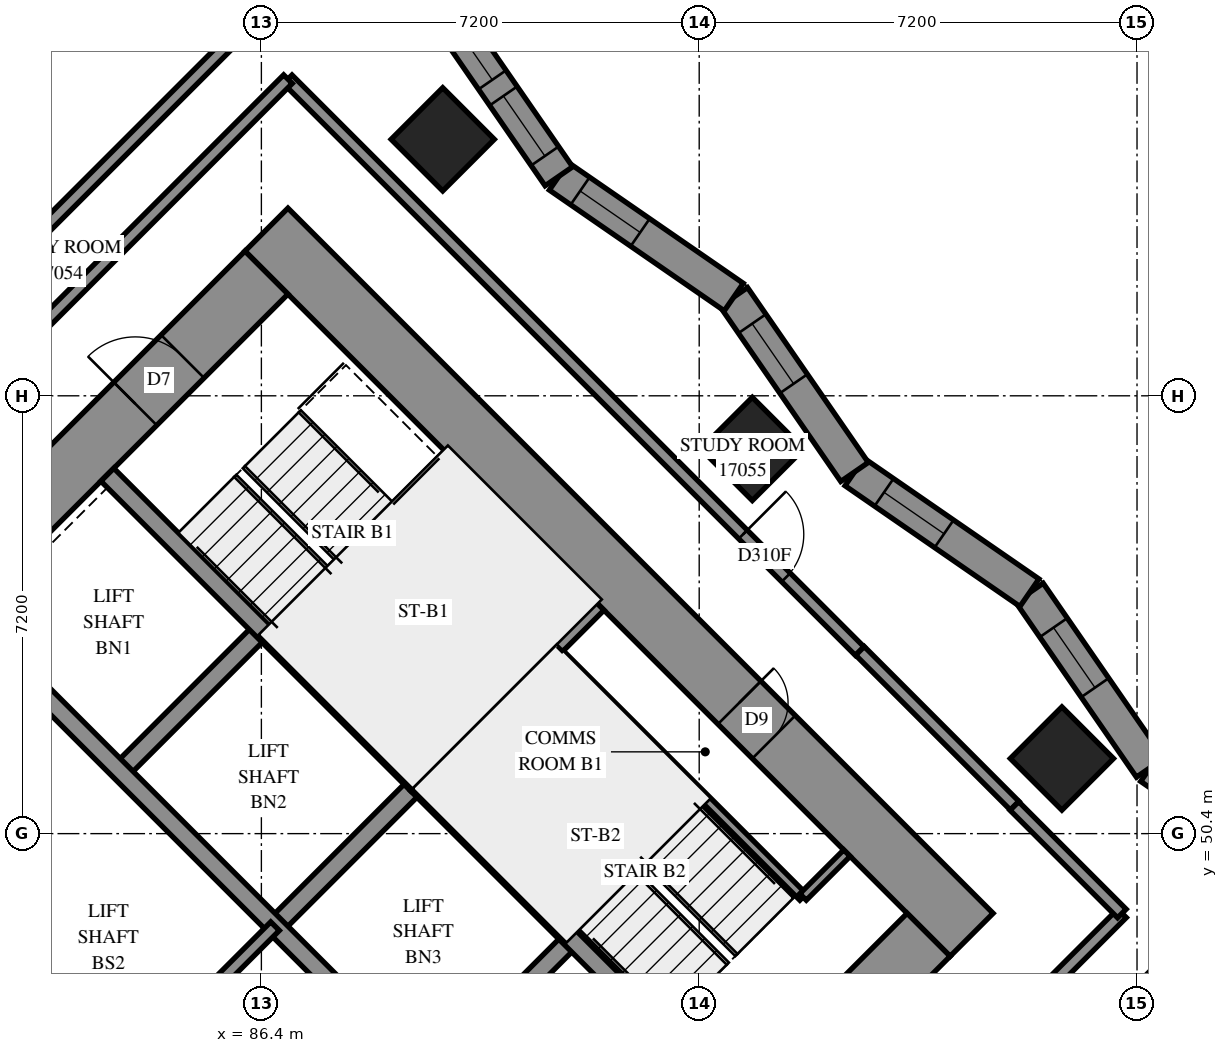
"""IFC4 building model, lengths in metres.
Left out: names, types, materials, properties, quantities, classifications, styles, units other than length and angle.
Written with IfcOpenShell. Run it as: python <this file> out.ifc"""

import sys

from ifc_helpers import new_model, si_unit, direction, frame, frame_2d, origin, origin_2d, place, context, subcontext, project, spatial, polyline, rectangle, outline, extrude, element, fill, save


model = new_model("IFC4")
c1 = context("Model", 3, precision=1e-05, world=origin(), true_north=direction((0.0, 1.0)))
c2 = subcontext(c1, "Body", "Model", "MODEL_VIEW")
j1 = project(units=[si_unit("LENGTHUNIT", "METRE"), si_unit("PLANEANGLEUNIT", "RADIAN")], contexts=[c1])
p1 = place(None, origin())
s1 = spatial("IfcSite", under=j1, at=p1, CompositionType="ELEMENT")
p2 = place(p1, origin())
s2 = spatial("IfcBuilding", under=s1, at=p2, CompositionType="ELEMENT")
p3 = place(p2, frame((0.0, 0.0, 64.4)))
s3 = spatial("IfcBuildingStorey", under=s2, at=p3, CompositionType="ELEMENT", Elevation=64.4)
for number, where, z_axis, x_axis in (
    (1, (89.382, 61.818, 0.0), (0.0, 0.0, 1.0), (0.707, -0.707, 0.0)),
    (2, (94.474, 56.727, 0.0), (0.0, 0.0, 1.0), (0.707, -0.707, 0.0)),
    (3, (99.565, 51.635, 0.0), (0.0, 0.0, 1.0), (0.707, -0.707, 0.0)),
):
    element("IfcColumn", number, at=place(p3, frame(where, z_axis=z_axis, x_axis=x_axis)), inside=s3, PredefinedType="COLUMN", context=c2, shape_type="SweptSolid", body=[
        extrude(rectangle(XDim=1.2, YDim=1.2, at=origin_2d()), origin(), (0.0, 0.0, 1.0), 3.1),
    ])
p4 = place(p3, frame((75.594, 49.443, -0.3), z_axis=(0.0, 0.0, 1.0), x_axis=(0.7071037324, -0.70710983, 0.0)))
e4 = element("IfcWall", 4, at=p4, inside=s3, PredefinedType="SHEAR", context=c2, shape_type="SweptSolid", body=[
    extrude(rectangle(XDim=16.4, YDim=1.0, at=frame_2d((8.2, 0.0))), origin(), (0.0, 0.0, 1.0), 2.7),
])
p5 = place(p3, frame((86.483, 60.333, -0.3), z_axis=(0.0, 0.0, 1.0), x_axis=(0.70710983, -0.7071037324, 0.0)))
e5 = element("IfcWall", 5, at=p5, inside=s3, PredefinedType="SHEAR", context=c2, shape_type="SweptSolid", body=[
    extrude(rectangle(XDim=16.4, YDim=1.0, at=frame_2d((8.2, 0.0))), origin(), (0.0, 0.0, 1.0), 2.7),
])
p6 = place(p5, frame((11.0, 0.0, 0.3)))
e6 = element("IfcOpeningElement", 6, at=p6, cuts=e5, PredefinedType="OPENING", context=c2, shape_type="SweptSolid", body=[
    extrude(rectangle(XDim=0.8, YDim=2.1, at=frame_2d((0.4, 1.05))), frame((0.0, 0.51, 0.0), z_axis=(0.0, -1.0, 0.0), x_axis=(1.0, 0.0, 0.0)), (0.0, 0.0, 1.0), 1.02),
])
p7 = place(p3, frame((76.301, 49.443, -0.3), z_axis=(0.0, 0.0, 1.0), x_axis=(0.7071067812, 0.7071067812, 0.0)))
e7 = element("IfcWall", 7, at=p7, inside=s3, PredefinedType="SHEAR", context=c2, shape_type="SweptSolid", body=[
    extrude(rectangle(XDim=14.4, YDim=1.0, at=frame_2d((7.2, 0.0))), origin(), (0.0, 0.0, 1.0), 2.7),
])
p8 = place(p7, frame((4.55, 0.0, 0.3)))
e8 = element("IfcOpeningElement", 8, at=p8, cuts=e7, PredefinedType="OPENING", context=c2, shape_type="SweptSolid", body=[
    extrude(rectangle(XDim=1.1, YDim=2.1, at=frame_2d((0.55, 1.05))), frame((0.0, 0.51, 0.0), z_axis=(0.0, -1.0, 0.0), x_axis=(1.0, 0.0, 0.0)), (0.0, 0.0, 1.0), 1.02),
])
p9 = place(p7, frame((11.35, 0.0, 0.3)))
e9 = element("IfcOpeningElement", 9, at=p9, cuts=e7, PredefinedType="OPENING", context=c2, shape_type="SweptSolid", body=[
    extrude(rectangle(XDim=1.1, YDim=2.1, at=frame_2d((0.55, 1.05))), frame((0.0, 0.51, 0.0), z_axis=(0.0, -1.0, 0.0), x_axis=(1.0, 0.0, 0.0)), (0.0, 0.0, 1.0), 1.02),
])
p10 = place(p3, frame((87.19, 38.554, -0.3), z_axis=(0.0, 0.0, 1.0), x_axis=(0.707103309, 0.7071102534, 0.0)))
e10 = element("IfcWall", 10, at=p10, inside=s3, PredefinedType="SHEAR", context=c2, shape_type="SweptSolid", body=[
    extrude(rectangle(XDim=14.4, YDim=1.0, at=frame_2d((7.2, 0.0))), origin(), (0.0, 0.0, 1.0), 2.7),
])
p11 = place(p10, frame((4.55, 0.0, 0.3)))
e11 = element("IfcOpeningElement", 11, at=p11, cuts=e10, PredefinedType="OPENING", context=c2, shape_type="SweptSolid", body=[
    extrude(rectangle(XDim=1.1, YDim=2.1, at=frame_2d((0.55, 1.05))), frame((0.0, 0.51, 0.0), z_axis=(0.0, -1.0, 0.0), x_axis=(1.0, 0.0, 0.0)), (0.0, 0.0, 1.0), 1.02),
])
p12 = place(p10, frame((11.35, 0.0, 0.3)))
e12 = element("IfcOpeningElement", 12, at=p12, cuts=e10, PredefinedType="OPENING", context=c2, shape_type="SweptSolid", body=[
    extrude(rectangle(XDim=1.1, YDim=2.1, at=frame_2d((0.55, 1.05))), frame((0.0, 0.51, 0.0), z_axis=(0.0, -1.0, 0.0), x_axis=(1.0, 0.0, 0.0)), (0.0, 0.0, 1.0), 1.02),
])
p13 = place(p3, frame((84.079, 51.423, 0.0), z_axis=(0.0, 0.0, 1.0), x_axis=(0.7071219326, 0.7070916295, 0.0)))
e13 = element("IfcWall", 13, at=p13, inside=s3, PredefinedType="SOLIDWALL", context=c2, shape_type="SweptSolid", body=[
    extrude(rectangle(XDim=3.3, YDim=0.3, at=frame_2d((1.65, 0.0))), origin(), (0.0, 0.0, 1.0), 3.1),
])
for number, where, z_axis, x_axis in (
    (14, (86.625, 48.878, 0.0), (0.0, 0.0, 1.0), (0.707, 0.707, 0.0)),
    (15, (89.17, 46.332, 0.0), (0.0, 0.0, 1.0), (0.707, 0.707, 0.0)),
):
    element("IfcWall", number, at=place(p3, frame(where, z_axis=z_axis, x_axis=x_axis)), inside=s3, PredefinedType="SOLIDWALL", context=c2, shape_type="SweptSolid", body=[
        extrude(rectangle(XDim=3.3, YDim=0.3, at=frame_2d((1.65, 0.0))), origin(), (0.0, 0.0, 1.0), 3.1),
    ])
p14 = place(p3, frame((78.988, 51.423, 0.0), z_axis=(0.0, 0.0, 1.0), x_axis=(0.7071067812, -0.7071067812, 0.0)))
e16 = element("IfcWall", 16, at=p14, inside=s3, PredefinedType="SOLIDWALL", context=c2, shape_type="SweptSolid", body=[
    extrude(rectangle(XDim=14.4, YDim=0.3, at=frame_2d((7.2, 0.0))), origin(), (0.0, 0.0, 1.0), 3.1),
])
p15 = place(p14, frame((1.25, 0.0, 0.0)))
e17 = element("IfcOpeningElement", 17, at=p15, cuts=e16, PredefinedType="OPENING", context=c2, shape_type="SweptSolid", body=[
    extrude(rectangle(XDim=1.1, YDim=2.1, at=frame_2d((0.55, 1.05))), frame((0.0, 0.16, 0.0), z_axis=(0.0, -1.0, 0.0), x_axis=(1.0, 0.0, 0.0)), (0.0, 0.0, 1.0), 0.32),
])
p16 = place(p14, frame((4.85, 0.0, 0.0)))
e18 = element("IfcOpeningElement", 18, at=p16, cuts=e16, PredefinedType="OPENING", context=c2, shape_type="SweptSolid", body=[
    extrude(rectangle(XDim=1.1, YDim=2.1, at=frame_2d((0.55, 1.05))), frame((0.0, 0.16, 0.0), z_axis=(0.0, -1.0, 0.0), x_axis=(1.0, 0.0, 0.0)), (0.0, 0.0, 1.0), 0.32),
])
p17 = place(p14, frame((8.45, 0.0, 0.0)))
e19 = element("IfcOpeningElement", 19, at=p17, cuts=e16, PredefinedType="OPENING", context=c2, shape_type="SweptSolid", body=[
    extrude(rectangle(XDim=1.1, YDim=2.1, at=frame_2d((0.55, 1.05))), frame((0.0, 0.16, 0.0), z_axis=(0.0, -1.0, 0.0), x_axis=(1.0, 0.0, 0.0)), (0.0, 0.0, 1.0), 0.32),
])
p18 = place(p14, frame((12.05, 0.0, 0.0)))
e20 = element("IfcOpeningElement", 20, at=p18, cuts=e16, PredefinedType="OPENING", context=c2, shape_type="SweptSolid", body=[
    extrude(rectangle(XDim=1.1, YDim=2.1, at=frame_2d((0.55, 1.05))), frame((0.0, 0.16, 0.0), z_axis=(0.0, -1.0, 0.0), x_axis=(1.0, 0.0, 0.0)), (0.0, 0.0, 1.0), 0.32),
])
p19 = place(p3, frame((81.534, 53.969, 0.0), z_axis=(0.0, 0.0, 1.0), x_axis=(0.707103309, -0.7071102534, 0.0)))
e21 = element("IfcWall", 21, at=p19, inside=s3, PredefinedType="SOLIDWALL", context=c2, shape_type="SweptSolid", body=[
    extrude(rectangle(XDim=14.4, YDim=0.3, at=frame_2d((7.2, 0.0))), origin(), (0.0, 0.0, 1.0), 3.1),
])
p20 = place(p19, frame((12.05, 0.0, 0.0)))
e22 = element("IfcOpeningElement", 22, at=p20, cuts=e21, PredefinedType="OPENING", context=c2, shape_type="SweptSolid", body=[
    extrude(rectangle(XDim=1.1, YDim=2.1, at=frame_2d((0.55, 1.05))), frame((0.0, 0.16, 0.0), z_axis=(0.0, -1.0, 0.0), x_axis=(1.0, 0.0, 0.0)), (0.0, 0.0, 1.0), 0.32),
])
for number, where, z_axis, x_axis in (
    (23, (83.867, 56.302, 0.0), (0.0, 0.0, 1.0), (0.707, -0.707, 0.0)),
    (24, (88.958, 51.211, 0.0), (0.0, 0.0, 1.0), (0.707, -0.707, 0.0)),
):
    element("IfcWall", number, at=place(p3, frame(where, z_axis=z_axis, x_axis=x_axis)), inside=s3, PredefinedType="SOLIDWALL", context=c2, shape_type="SweptSolid", body=[
        extrude(rectangle(XDim=7.2, YDim=0.3, at=frame_2d((3.6, 0.0))), origin(), (0.0, 0.0, 1.0), 3.1),
    ])
p21 = place(p3, frame((88.958, 51.211, 0.0), z_axis=(0.0, 0.0, 1.0), x_axis=(0.7071067812, 0.7071067812, 0.0)))
e25 = element("IfcWall", 25, at=p21, inside=s3, PredefinedType="SOLIDWALL", context=c2, shape_type="SweptSolid", body=[
    extrude(rectangle(XDim=4.2, YDim=0.3, at=frame_2d((2.1, 0.0))), origin(), (0.0, 0.0, 1.0), 3.1),
])
p22 = place(p3, frame((103.893, 49.499, 0.0), z_axis=(0.0, 0.0, 1.0), x_axis=(-0.8229761943, 0.5680758609, 0.0)))
e26 = element("IfcWall", 26, at=p22, inside=s3, PredefinedType="SOLIDWALL", context=c2, shape_type="SweptSolid", body=[
    extrude(outline(polyline([(-0.05, -0.275), (3.445, -0.275), (3.546, 0.275), (0.05, 0.275), (-0.05, -0.275)])), origin(), (0.0, 0.0, 1.0), 3.1),
])
p23 = place(p22, frame((1.541, 0.0, 0.5)))
e27 = element("IfcOpeningElement", 27, at=p23, cuts=e26, PredefinedType="OPENING", context=c2, shape_type="SweptSolid", body=[
    extrude(rectangle(XDim=1.2, YDim=2.45, at=frame_2d((0.6, 1.225))), frame((0.0, 0.285, 0.0), z_axis=(0.0, -1.0, 0.0), x_axis=(1.0, 0.0, 0.0)), (0.0, 0.0, 1.0), 0.57),
])
p24 = place(p3, frame((101.016, 51.485, 0.0), z_axis=(0.0, 0.0, 1.0), x_axis=(-0.5680892359, 0.8229669617, 0.0)))
e28 = element("IfcWall", 28, at=p24, inside=s3, PredefinedType="SOLIDWALL", context=c2, shape_type="SweptSolid", body=[
    extrude(outline(polyline([(0.05, -0.275), (3.546, -0.275), (3.445, 0.275), (-0.05, 0.275), (0.05, -0.275)])), origin(), (0.0, 0.0, 1.0), 3.1),
])
p25 = place(p24, frame((1.598, 0.0, 0.5)))
e29 = element("IfcOpeningElement", 29, at=p25, cuts=e28, PredefinedType="OPENING", context=c2, shape_type="SweptSolid", body=[
    extrude(rectangle(XDim=1.2, YDim=2.45, at=frame_2d((0.6, 1.225))), frame((0.0, 0.285, 0.0), z_axis=(0.0, -1.0, 0.0), x_axis=(1.0, 0.0, 0.0)), (0.0, 0.0, 1.0), 0.57),
])
p26 = place(p3, frame((99.031, 54.362, 0.0), z_axis=(0.0, 0.0, 1.0), x_axis=(-0.8229669617, 0.5680892359, 0.0)))
e30 = element("IfcWall", 30, at=p26, inside=s3, PredefinedType="SOLIDWALL", context=c2, shape_type="SweptSolid", body=[
    extrude(outline(polyline([(-0.05, -0.275), (3.445, -0.275), (3.546, 0.275), (0.05, 0.275), (-0.05, -0.275)])), origin(), (0.0, 0.0, 1.0), 3.1),
])
p27 = place(p26, frame((1.706, 0.0, 0.5)))
e31 = element("IfcOpeningElement", 31, at=p27, cuts=e30, PredefinedType="OPENING", context=c2, shape_type="SweptSolid", body=[
    extrude(rectangle(XDim=1.2, YDim=2.45, at=frame_2d((0.6, 1.225))), frame((0.0, 0.285, 0.0), z_axis=(0.0, -1.0, 0.0), x_axis=(1.0, 0.0, 0.0)), (0.0, 0.0, 1.0), 0.57),
])
p28 = place(p3, frame((96.154, 56.347, 0.0), z_axis=(0.0, 0.0, 1.0), x_axis=(-0.5680892359, 0.8229669617, 0.0)))
e32 = element("IfcWall", 32, at=p28, inside=s3, PredefinedType="SOLIDWALL", context=c2, shape_type="SweptSolid", body=[
    extrude(outline(polyline([(0.05, -0.275), (3.546, -0.275), (3.445, 0.275), (-0.05, 0.275), (0.05, -0.275)])), origin(), (0.0, 0.0, 1.0), 3.1),
])
p29 = place(p28, frame((1.763, 0.0, 0.5)))
e33 = element("IfcOpeningElement", 33, at=p29, cuts=e32, PredefinedType="OPENING", context=c2, shape_type="SweptSolid", body=[
    extrude(rectangle(XDim=1.2, YDim=2.45, at=frame_2d((0.6, 1.225))), frame((0.0, 0.285, 0.0), z_axis=(0.0, -1.0, 0.0), x_axis=(1.0, 0.0, 0.0)), (0.0, 0.0, 1.0), 0.57),
])
p30 = place(p3, frame((94.168, 59.224, 0.0), z_axis=(0.0, 0.0, 1.0), x_axis=(-0.8229669617, 0.5680892359, 0.0)))
e34 = element("IfcWall", 34, at=p30, inside=s3, PredefinedType="SOLIDWALL", context=c2, shape_type="SweptSolid", body=[
    extrude(outline(polyline([(-0.05, -0.275), (3.445, -0.275), (3.546, 0.275), (0.05, 0.275), (-0.05, -0.275)])), origin(), (0.0, 0.0, 1.0), 3.1),
])
p31 = place(p30, frame((1.87, 0.0, 0.5)))
e35 = element("IfcOpeningElement", 35, at=p31, cuts=e34, PredefinedType="OPENING", context=c2, shape_type="SweptSolid", body=[
    extrude(rectangle(XDim=1.2, YDim=2.45, at=frame_2d((0.6, 1.225))), frame((0.0, 0.285, 0.0), z_axis=(0.0, -1.0, 0.0), x_axis=(1.0, 0.0, 0.0)), (0.0, 0.0, 1.0), 0.57),
])
p32 = place(p3, frame((91.292, 61.21, 0.0), z_axis=(0.0, 0.0, 1.0), x_axis=(-0.5680892359, 0.8229669617, 0.0)))
e36 = element("IfcWall", 36, at=p32, inside=s3, PredefinedType="SOLIDWALL", context=c2, shape_type="SweptSolid", body=[
    extrude(outline(polyline([(0.05, -0.275), (3.546, -0.275), (3.445, 0.275), (-0.05, 0.275), (0.05, -0.275)])), origin(), (0.0, 0.0, 1.0), 3.1),
])
p33 = place(p32, frame((0.405, 0.0, 0.5)))
e37 = element("IfcOpeningElement", 37, at=p33, cuts=e36, PredefinedType="OPENING", context=c2, shape_type="SweptSolid", body=[
    extrude(rectangle(XDim=1.2, YDim=2.45, at=frame_2d((0.6, 1.225))), frame((0.0, 0.285, 0.0), z_axis=(0.0, -1.0, 0.0), x_axis=(1.0, 0.0, 0.0)), (0.0, 0.0, 1.0), 0.57),
])
p34 = place(p32, frame((1.927, 0.0, 0.5)))
e38 = element("IfcOpeningElement", 38, at=p34, cuts=e36, PredefinedType="OPENING", context=c2, shape_type="SweptSolid", body=[
    extrude(rectangle(XDim=1.2, YDim=2.45, at=frame_2d((0.6, 1.225))), frame((0.0, 0.285, 0.0), z_axis=(0.0, -1.0, 0.0), x_axis=(1.0, 0.0, 0.0)), (0.0, 0.0, 1.0), 0.57),
])
p35 = place(p3, frame((91.313, 53.354, 0.0), z_axis=(0.0, 0.0, 1.0), x_axis=(0.7071067812, -0.7071067812, 0.0)))
e39 = element("IfcWall", 39, at=p35, inside=s3, PredefinedType="PARTITIONING", context=c2, shape_type="SweptSolid", body=[
    extrude(rectangle(XDim=5.65, YDim=0.15, at=frame_2d((2.825, 0.0))), origin(), (0.0, 0.0, 1.0), 3.1),
])
p36 = place(p3, frame((95.308, 49.358, 0.0), z_axis=(0.0, 0.0, 1.0), x_axis=(0.70705776, 0.707155799, 0.0)))
e40 = element("IfcWall", 40, at=p36, inside=s3, PredefinedType="PARTITIONING", context=c2, shape_type="SweptSolid", body=[
    extrude(rectangle(XDim=1.02, YDim=0.15, at=frame_2d((0.51, 0.0))), origin(), (0.0, 0.0, 1.0), 3.1),
])
p37 = place(p3, frame((84.079, 46.332, 0.0), z_axis=(0.0, 0.0, 1.0), x_axis=(0.7071067812, 0.7071067812, 0.0)))
e41 = element("IfcWall", 41, at=p37, inside=s3, PredefinedType="PARTITIONING", context=c2, shape_type="SweptSolid", body=[
    extrude(rectangle(XDim=3.6, YDim=0.2, at=frame_2d((1.8, 0.0))), origin(), (0.0, 0.0, 1.0), 3.1),
])
p38 = place(p3, frame((86.833, 62.805, 0.0), z_axis=(0.0, 0.0, 1.0), x_axis=(0.7072045138, -0.7070090351, 0.0)))
e42 = element("IfcWall", 42, at=p38, inside=s3, PredefinedType="PARTITIONING", context=c2, shape_type="SweptSolid", body=[
    extrude(rectangle(XDim=13.301, YDim=0.2, at=frame_2d((6.65, 0.0))), origin(), (0.0, 0.0, 1.0), 3.1),
])
p39 = place(p38, frame((10.586, 0.0, 0.0)))
e43 = element("IfcOpeningElement", 43, at=p39, cuts=e42, PredefinedType="OPENING", context=c2, shape_type="SweptSolid", body=[
    extrude(rectangle(XDim=1.0, YDim=2.1, at=frame_2d((0.5, 1.05))), frame((0.0, 0.11, 0.0), z_axis=(0.0, -1.0, 0.0), x_axis=(1.0, 0.0, 0.0)), (0.0, 0.0, 1.0), 0.22),
])
p40 = place(p3, frame((94.259, 41.243, 0.0), z_axis=(0.0, 0.0, 1.0), x_axis=(0.7070206559, 0.7071928959, 0.0)))
e44 = element("IfcWall", 44, at=p40, inside=s3, PredefinedType="PARTITIONING", context=c2, shape_type="SweptSolid", body=[
    extrude(rectangle(XDim=12.192, YDim=0.2, at=frame_2d((6.096, 0.0))), origin(), (0.0, 0.0, 1.0), 3.1),
])
p41 = place(p3, frame((93.484, 42.02, 0.0), z_axis=(0.0, 0.0, 1.0), x_axis=(0.7071067812, 0.7071067812, 0.0)))
e45 = element("IfcWall", 45, at=p41, inside=s3, PredefinedType="PARTITIONING", context=c2, shape_type="SweptSolid", body=[
    extrude(rectangle(XDim=9.998, YDim=0.2, at=frame_2d((4.999, 0.0))), origin(), (0.0, 0.0, 1.0), 3.1),
])
p42 = place(p41, frame((0.148, 0.0, 0.0)))
e46 = element("IfcOpeningElement", 46, at=p42, cuts=e45, PredefinedType="OPENING", context=c2, shape_type="SweptSolid", body=[
    extrude(rectangle(XDim=1.0, YDim=2.1, at=frame_2d((0.5, 1.05))), frame((0.0, 0.11, 0.0), z_axis=(0.0, -1.0, 0.0), x_axis=(1.0, 0.0, 0.0)), (0.0, 0.0, 1.0), 0.22),
])
p43 = place(p3, frame((81.049, 58.577, 0.0), z_axis=(0.0, 0.0, 1.0), x_axis=(0.7071067812, 0.7071067812, 0.0)))
e47 = element("IfcWall", 47, at=p43, inside=s3, PredefinedType="PARTITIONING", context=c2, shape_type="SweptSolid", body=[
    extrude(rectangle(XDim=9.099, YDim=0.2, at=frame_2d((4.55, 0.0))), origin(), (0.0, 0.0, 1.0), 3.1),
])
p44 = place(p3, frame((81.053, 57.021, 0.0), z_axis=(0.0, 0.0, 1.0), x_axis=(0.7069845395, 0.7072290017, 0.0)))
e48 = element("IfcWall", 48, at=p44, inside=s3, PredefinedType="PARTITIONING", context=c2, shape_type="SweptSolid", body=[
    extrude(rectangle(XDim=8.181, YDim=0.2, at=frame_2d((4.091, 0.0))), origin(), (0.0, 0.0, 1.0), 3.1),
])
p45 = place(p44, frame((0.86, 0.0, 0.0)))
e49 = element("IfcOpeningElement", 49, at=p45, cuts=e48, PredefinedType="OPENING", context=c2, shape_type="SweptSolid", body=[
    extrude(rectangle(XDim=1.0, YDim=2.1, at=frame_2d((0.5, 1.05))), frame((0.0, 0.11, 0.0), z_axis=(0.0, -1.0, 0.0), x_axis=(1.0, 0.0, 0.0)), (0.0, 0.0, 1.0), 0.22),
])
p46 = place(p3, frame((96.244, 53.406, 0.0), z_axis=(0.0, 0.0, 1.0), x_axis=(0.7068288851, -0.7073845681, 0.0)))
e50 = element("IfcWall", 50, at=p46, inside=s3, PredefinedType="PARTITIONING", context=c2, shape_type="SweptSolid", body=[
    extrude(rectangle(XDim=3.599, YDim=0.2, at=frame_2d((1.8, 0.0))), origin(), (0.0, 0.0, 1.0), 3.1),
])
p47 = place(p3, frame((98.783, 50.855, 0.0), z_axis=(0.0, 0.0, 1.0), x_axis=(0.7071067812, -0.7071067812, 0.0)))
e51 = element("IfcWall", 51, at=p47, inside=s3, PredefinedType="PARTITIONING", context=c2, shape_type="SweptSolid", body=[
    extrude(rectangle(XDim=2.5, YDim=0.2, at=frame_2d((1.25, 0.0))), origin(), (0.0, 0.0, 1.0), 3.1),
])
p48 = place(p25, origin())
e52 = element("IfcWindow", 52, at=p48, inside=s3, PartitioningType="SINGLE_PANEL", PredefinedType="WINDOW", context=c2, shape_type="SweptSolid", body=[
    extrude(rectangle(XDim=1.2, YDim=2.45, at=frame_2d((0.6, 1.225))), frame((0.0, 0.155, 0.0), z_axis=(0.0, -1.0, 0.0), x_axis=(1.0, 0.0, 0.0)), (0.0, 0.0, 1.0), 0.06),
])
fill(e29, e52)
p49 = place(p27, origin())
e53 = element("IfcWindow", 53, at=p49, inside=s3, PartitioningType="SINGLE_PANEL", PredefinedType="WINDOW", context=c2, shape_type="SweptSolid", body=[
    extrude(rectangle(XDim=1.2, YDim=2.45, at=frame_2d((0.6, 1.225))), frame((0.0, 0.155, 0.0), z_axis=(0.0, -1.0, 0.0), x_axis=(1.0, 0.0, 0.0)), (0.0, 0.0, 1.0), 0.06),
])
fill(e31, e53)
p50 = place(p29, origin())
e54 = element("IfcWindow", 54, at=p50, inside=s3, PartitioningType="SINGLE_PANEL", PredefinedType="WINDOW", context=c2, shape_type="SweptSolid", body=[
    extrude(rectangle(XDim=1.2, YDim=2.45, at=frame_2d((0.6, 1.225))), frame((0.0, 0.155, 0.0), z_axis=(0.0, -1.0, 0.0), x_axis=(1.0, 0.0, 0.0)), (0.0, 0.0, 1.0), 0.06),
])
fill(e33, e54)
p51 = place(p31, origin())
e55 = element("IfcWindow", 55, at=p51, inside=s3, PartitioningType="SINGLE_PANEL", PredefinedType="WINDOW", context=c2, shape_type="SweptSolid", body=[
    extrude(rectangle(XDim=1.2, YDim=2.45, at=frame_2d((0.6, 1.225))), frame((0.0, 0.155, 0.0), z_axis=(0.0, -1.0, 0.0), x_axis=(1.0, 0.0, 0.0)), (0.0, 0.0, 1.0), 0.06),
])
fill(e35, e55)
p52 = place(p33, origin())
e56 = element("IfcWindow", 56, at=p52, inside=s3, PartitioningType="SINGLE_PANEL", PredefinedType="WINDOW", context=c2, shape_type="SweptSolid", body=[
    extrude(rectangle(XDim=1.2, YDim=2.45, at=frame_2d((0.6, 1.225))), frame((0.0, 0.155, 0.0), z_axis=(0.0, -1.0, 0.0), x_axis=(1.0, 0.0, 0.0)), (0.0, 0.0, 1.0), 0.06),
])
fill(e37, e56)
p53 = place(p34, origin())
e57 = element("IfcWindow", 57, at=p53, inside=s3, PartitioningType="SINGLE_PANEL", PredefinedType="WINDOW", context=c2, shape_type="SweptSolid", body=[
    extrude(rectangle(XDim=1.2, YDim=2.45, at=frame_2d((0.6, 1.225))), frame((0.0, 0.155, 0.0), z_axis=(0.0, -1.0, 0.0), x_axis=(1.0, 0.0, 0.0)), (0.0, 0.0, 1.0), 0.06),
])
fill(e38, e57)
p54 = place(p6, origin())
e58 = element("IfcDoor", 58, at=p54, inside=s3, OperationType="SINGLE_SWING_RIGHT", PredefinedType="DOOR", context=c2, shape_type="SweptSolid", body=[
    extrude(rectangle(XDim=0.8, YDim=2.1, at=frame_2d((0.4, 1.05))), frame((0.0, -0.44, 0.0), z_axis=(0.0, -1.0, 0.0), x_axis=(1.0, 0.0, 0.0)), (0.0, 0.0, 1.0), 0.05),
])
fill(e6, e58)
p55 = place(p9, origin())
e59 = element("IfcDoor", 59, at=p55, inside=s3, OperationType="SINGLE_SWING_LEFT", PredefinedType="DOOR", context=c2, shape_type="SweptSolid", body=[
    extrude(rectangle(XDim=1.1, YDim=2.1, at=frame_2d((0.55, 1.05))), frame((0.0, 0.025, 0.0), z_axis=(0.0, -1.0, 0.0), x_axis=(1.0, 0.0, 0.0)), (0.0, 0.0, 1.0), 0.05),
])
fill(e9, e59)
p56 = place(p39, origin())
e60 = element("IfcDoor", 60, at=p56, inside=s3, OperationType="SINGLE_SWING_LEFT", PredefinedType="DOOR", context=c2, shape_type="SweptSolid", body=[
    extrude(rectangle(XDim=1.0, YDim=2.1, at=frame_2d((0.5, 1.05))), frame((0.0, 0.025, 0.0), z_axis=(0.0, -1.0, 0.0), x_axis=(1.0, 0.0, 0.0)), (0.0, 0.0, 1.0), 0.05),
])
fill(e43, e60)
save(model, sys.argv[1])
